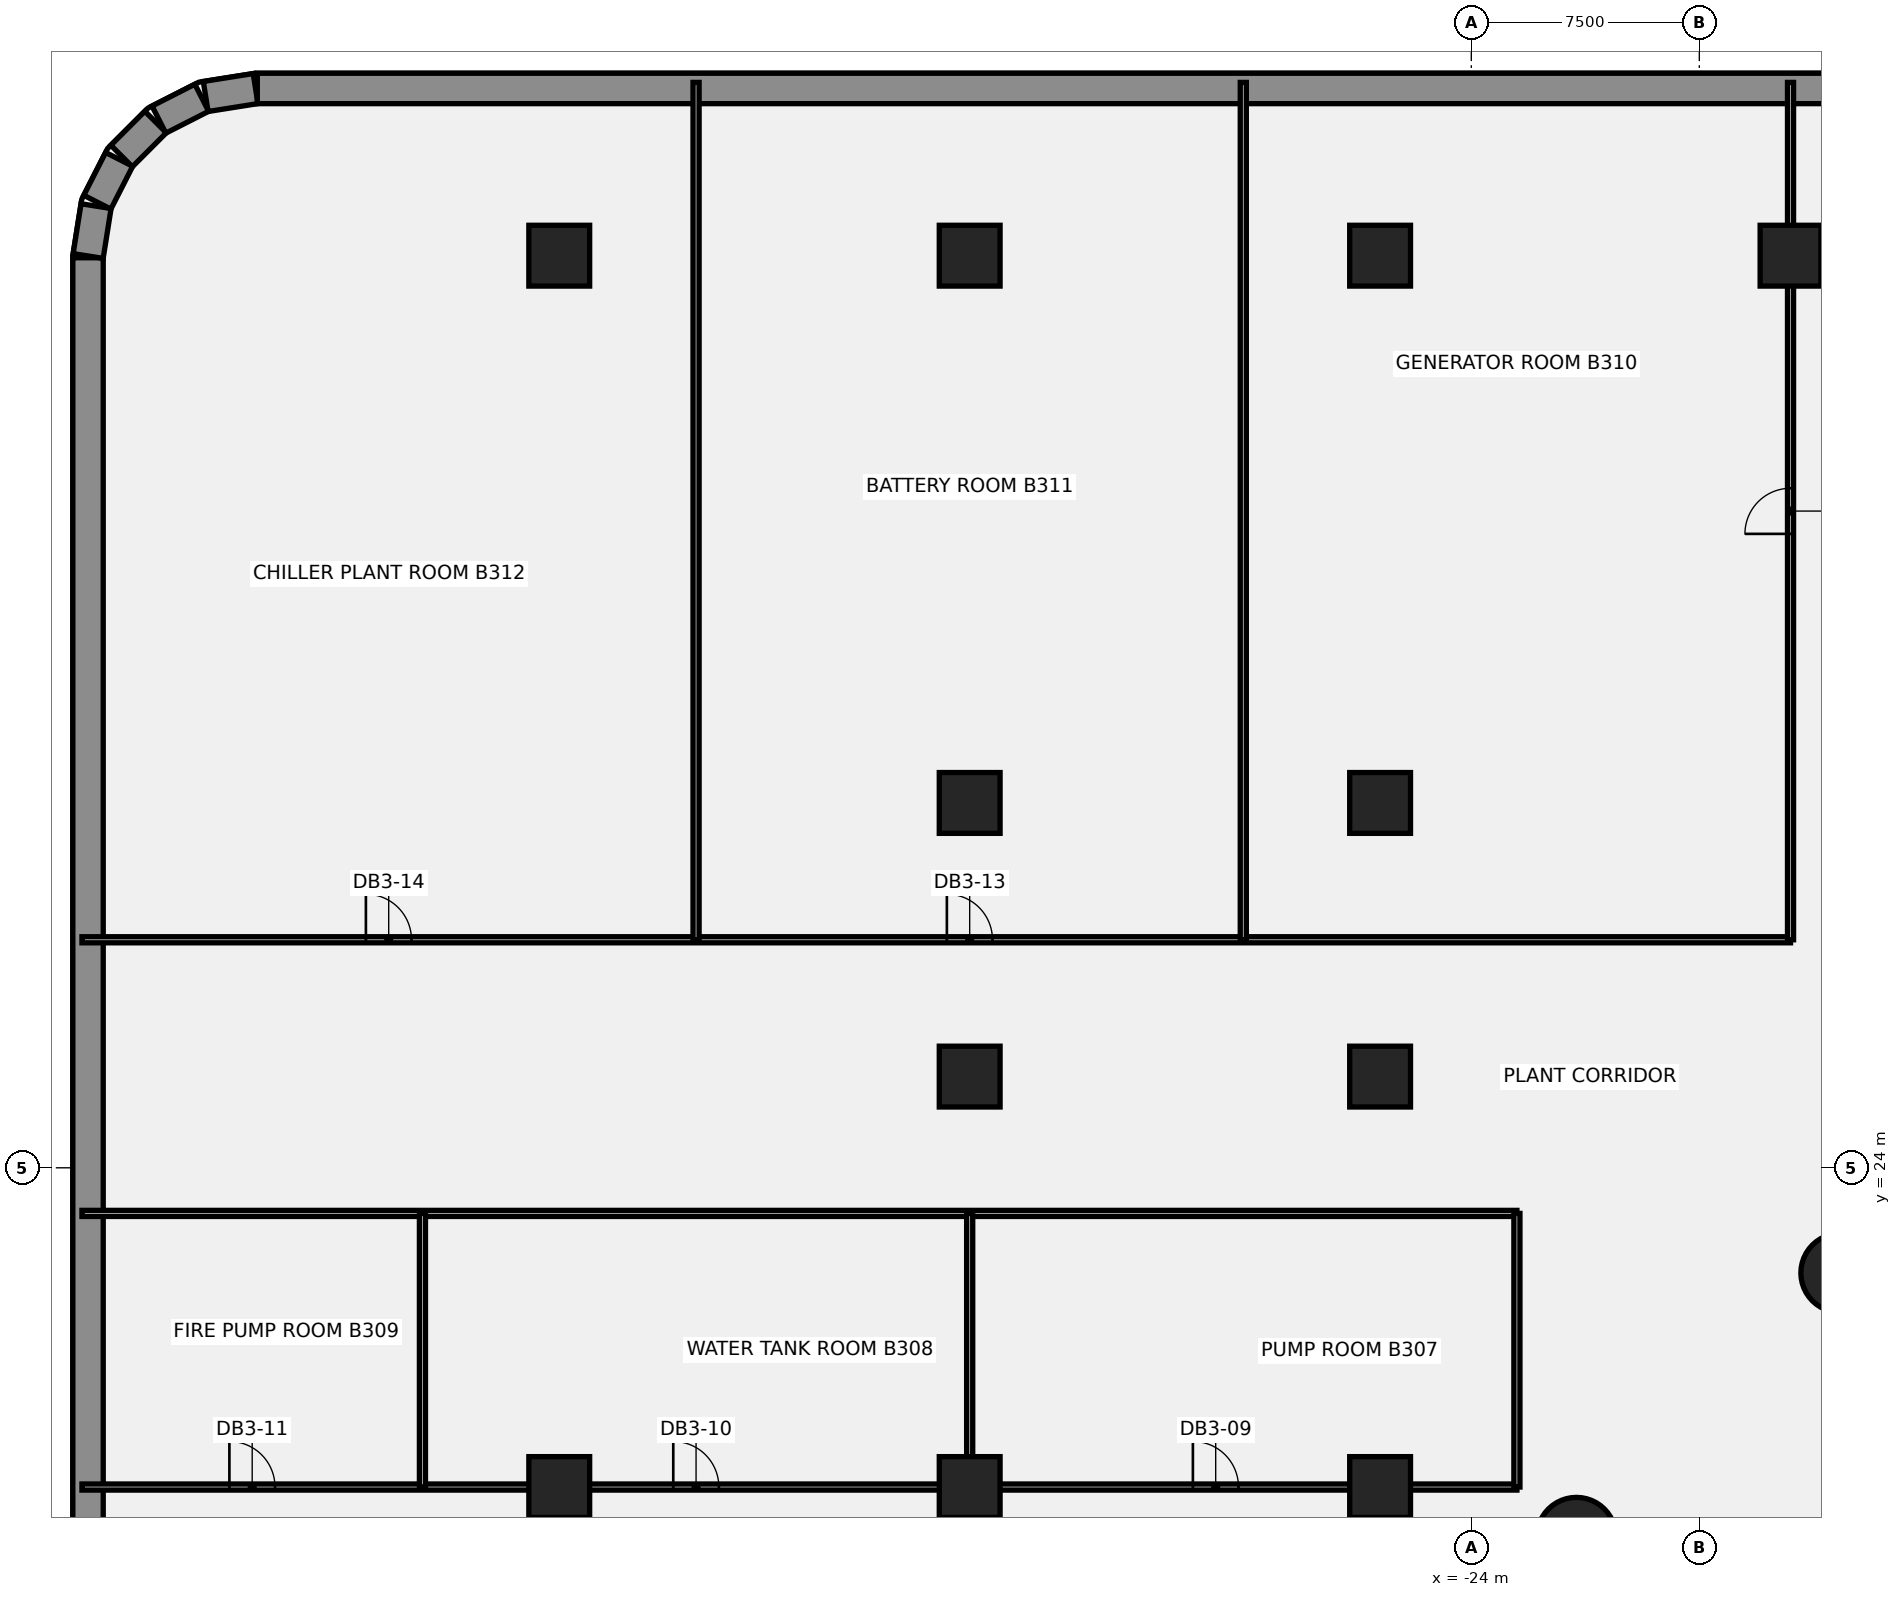
"""IFC4 building model, lengths in metres.
Left out: names, types, materials, properties, quantities, classifications, styles, units other than length and angle.
Written with IfcOpenShell. Run it as: python <this file> out.ifc"""

import sys

from ifc_helpers import new_model, si_unit, direction, frame, frame_2d, origin, origin_2d, place, context, subcontext, project, spatial, rectangle, circle, extrude, element, fill, save


model = new_model("IFC4")
c1 = context("Model", 3, precision=1e-05, world=origin(), true_north=direction((0.0, 1.0)))
c2 = subcontext(c1, "Body", "Model", "MODEL_VIEW")
j1 = project(units=[si_unit("LENGTHUNIT", "METRE"), si_unit("PLANEANGLEUNIT", "RADIAN")], contexts=[c1])
p1 = place(None, origin())
s1 = spatial("IfcSite", under=j1, at=p1, CompositionType="ELEMENT")
p2 = place(p1, origin())
s2 = spatial("IfcBuilding", under=s1, at=p2, CompositionType="ELEMENT")
p3 = place(p2, frame((0.0, 0.0, -21.0)))
s3 = spatial("IfcBuildingStorey", under=s2, at=p3, CompositionType="ELEMENT", Elevation=-21.0)
p4 = place(p3, frame((-69.5, -53.931, -0.3), z_axis=(0.0, 0.0, 1.0), x_axis=(0.0, 1.0, 0.0)))
e1 = element("IfcWall", 1, at=p4, inside=s3, PredefinedType="SOLIDWALL", context=c2, shape_type="SweptSolid", body=[
    extrude(rectangle(XDim=107.863, YDim=1.0, at=frame_2d((53.931, 0.0))), origin(), (0.0, 0.0, 1.0), 6.85),
])
p5 = place(p3, frame((-69.495, 53.99, -0.3), z_axis=(0.0, 0.0, 1.0), x_axis=(0.156430639922, 0.987688946427, 0.0)))
e2 = element("IfcWall", 2, at=p5, inside=s3, PredefinedType="SOLIDWALL", context=c2, shape_type="SweptSolid", body=[
    extrude(rectangle(XDim=1.661, YDim=1.0, at=frame_2d((0.83, 0.0))), origin(), (0.0, 0.0, 1.0), 6.85),
])
for number, where, z_axis, x_axis in (
    (3, (-69.194, 55.759, -0.3), (0.0, 0.0, 1.0), (0.454, 0.891, 0.0)),
    (4, (-68.396, 57.278, -0.3), (0.0, 0.0, 1.0), (0.707, 0.707, 0.0)),
    (5, (-67.168, 58.476, -0.3), (0.0, 0.0, 1.0), (0.891, 0.454, 0.0)),
):
    element("IfcWall", number, at=place(p3, frame(where, z_axis=z_axis, x_axis=x_axis)), inside=s3, PredefinedType="SOLIDWALL", context=c2, shape_type="SweptSolid", body=[
        extrude(rectangle(XDim=1.581, YDim=1.0, at=frame_2d((0.791, 0.0))), origin(), (0.0, 0.0, 1.0), 6.85),
    ])
p6 = place(p3, frame((-65.63, 59.236, -0.3), z_axis=(0.0, 0.0, 1.0), x_axis=(0.987688946427, 0.156430639922, 0.0)))
e6 = element("IfcWall", 6, at=p6, inside=s3, PredefinedType="SOLIDWALL", context=c2, shape_type="SweptSolid", body=[
    extrude(rectangle(XDim=1.661, YDim=1.0, at=frame_2d((0.83, 0.0))), origin(), (0.0, 0.0, 1.0), 6.85),
])
p7 = place(p3, frame((-63.931, 59.5, -0.3), z_axis=(0.0, 0.0, 1.0), x_axis=(1.0, 0.0, 0.0)))
e7 = element("IfcWall", 7, at=p7, inside=s3, PredefinedType="SOLIDWALL", context=c2, shape_type="SweptSolid", body=[
    extrude(rectangle(XDim=127.863, YDim=1.0, at=frame_2d((63.931, 0.0))), origin(), (0.0, 0.0, 1.0), 6.85),
])
for number, where, z_axis, x_axis in (
    (8, (-11.86, 20.543, -0.3), (0.0, 0.0, 1.0), (1.0, 0.0, 0.0)),
    (9, (-20.543, 11.86, -0.3), (0.0, 0.0, 1.0), (1.0, 0.0, 0.0)),
):
    element("IfcColumn", number, at=place(p3, frame(where, z_axis=z_axis, x_axis=x_axis)), inside=s3, PredefinedType="COLUMN", context=c2, shape_type="SweptSolid", body=[
        extrude(circle(Radius=1.3, at=origin_2d()), origin(), (0.0, 0.0, 1.0), 6.85),
    ])
for number, where, z_axis, x_axis in (
    (10, (-54.0, 13.5, -0.3), (0.0, 0.0, 1.0), (1.0, 0.0, 0.0)),
    (11, (-54.0, 54.0, -0.3), (0.0, 0.0, 1.0), (1.0, 0.0, 0.0)),
    (12, (-40.5, 13.5, -0.3), (0.0, 0.0, 1.0), (1.0, 0.0, 0.0)),
    (13, (-40.5, 27.0, -0.3), (0.0, 0.0, 1.0), (1.0, 0.0, 0.0)),
    (14, (-40.5, 36.0, -0.3), (0.0, 0.0, 1.0), (1.0, 0.0, 0.0)),
    (15, (-40.5, 54.0, -0.3), (0.0, 0.0, 1.0), (1.0, 0.0, 0.0)),
    (16, (-27.0, 13.5, -0.3), (0.0, 0.0, 1.0), (1.0, 0.0, 0.0)),
    (17, (-27.0, 27.0, -0.3), (0.0, 0.0, 1.0), (1.0, 0.0, 0.0)),
    (18, (-27.0, 36.0, -0.3), (0.0, 0.0, 1.0), (1.0, 0.0, 0.0)),
    (19, (-27.0, 54.0, -0.3), (0.0, 0.0, 1.0), (1.0, 0.0, 0.0)),
    (20, (-13.5, 54.0, -0.3), (0.0, 0.0, 1.0), (1.0, 0.0, 0.0)),
):
    element("IfcColumn", number, at=place(p3, frame(where, z_axis=z_axis, x_axis=x_axis)), inside=s3, PredefinedType="COLUMN", context=c2, shape_type="SweptSolid", body=[
        extrude(rectangle(XDim=2.0, YDim=2.0, at=origin_2d()), origin(), (0.0, 0.0, 1.0), 6.85),
    ])
p8 = place(p3, frame((-69.699, 13.5, 0.0), z_axis=(0.0, 0.0, 1.0), x_axis=(1.0, 0.0, 0.0)))
e21 = element("IfcWall", 21, at=p8, inside=s3, PredefinedType="PARTITIONING", context=c2, shape_type="SweptSolid", body=[
    extrude(rectangle(XDim=47.199, YDim=0.2, at=frame_2d((23.6, 0.0))), origin(), (0.0, 0.0, 1.0), 6.55),
])
p9 = place(p8, frame((36.541, 0.0, 0.0)))
e22 = element("IfcOpeningElement", 22, at=p9, cuts=e21, PredefinedType="OPENING", context=c2, shape_type="SweptSolid", body=[
    extrude(rectangle(XDim=1.5, YDim=2.1, at=frame_2d((0.75, 1.05))), frame((0.0, 0.11, 0.0), z_axis=(0.0, -1.0, 0.0), x_axis=(1.0, 0.0, 0.0)), (0.0, 0.0, 1.0), 0.22),
])
p10 = place(p8, frame((19.449, 0.0, 0.0)))
e23 = element("IfcOpeningElement", 23, at=p10, cuts=e21, PredefinedType="OPENING", context=c2, shape_type="SweptSolid", body=[
    extrude(rectangle(XDim=1.5, YDim=2.1, at=frame_2d((0.75, 1.05))), frame((0.0, 0.11, 0.0), z_axis=(0.0, -1.0, 0.0), x_axis=(1.0, 0.0, 0.0)), (0.0, 0.0, 1.0), 0.22),
])
p11 = place(p8, frame((4.849, 0.0, 0.0)))
e24 = element("IfcOpeningElement", 24, at=p11, cuts=e21, PredefinedType="OPENING", context=c2, shape_type="SweptSolid", body=[
    extrude(rectangle(XDim=1.5, YDim=2.1, at=frame_2d((0.75, 1.05))), frame((0.0, 0.11, 0.0), z_axis=(0.0, -1.0, 0.0), x_axis=(1.0, 0.0, 0.0)), (0.0, 0.0, 1.0), 0.22),
])
p12 = place(p3, frame((-69.699, 22.5, 0.0), z_axis=(0.0, 0.0, 1.0), x_axis=(1.0, 0.0, 0.0)))
e25 = element("IfcWall", 25, at=p12, inside=s3, PredefinedType="PARTITIONING", context=c2, shape_type="SweptSolid", body=[
    extrude(rectangle(XDim=47.199, YDim=0.2, at=frame_2d((23.6, 0.0))), origin(), (0.0, 0.0, 1.0), 6.55),
])
p13 = place(p3, frame((-69.699, 31.5, 0.0), z_axis=(0.0, 0.0, 1.0), x_axis=(1.0, 0.0, 0.0)))
e26 = element("IfcWall", 26, at=p13, inside=s3, PredefinedType="PARTITIONING", context=c2, shape_type="SweptSolid", body=[
    extrude(rectangle(XDim=56.199, YDim=0.2, at=frame_2d((28.1, 0.0))), origin(), (0.0, 0.0, 1.0), 6.55),
])
p14 = place(p13, frame((28.449, 0.0, 0.0)))
e27 = element("IfcOpeningElement", 27, at=p14, cuts=e26, PredefinedType="OPENING", context=c2, shape_type="SweptSolid", body=[
    extrude(rectangle(XDim=1.5, YDim=2.1, at=frame_2d((0.75, 1.05))), frame((0.0, 0.11, 0.0), z_axis=(0.0, -1.0, 0.0), x_axis=(1.0, 0.0, 0.0)), (0.0, 0.0, 1.0), 0.22),
])
p15 = place(p13, frame((9.339, 0.0, 0.0)))
e28 = element("IfcOpeningElement", 28, at=p15, cuts=e26, PredefinedType="OPENING", context=c2, shape_type="SweptSolid", body=[
    extrude(rectangle(XDim=1.5, YDim=2.1, at=frame_2d((0.75, 1.05))), frame((0.0, 0.11, 0.0), z_axis=(0.0, -1.0, 0.0), x_axis=(1.0, 0.0, 0.0)), (0.0, 0.0, 1.0), 0.22),
])
p16 = place(p3, frame((-58.5, 13.5, 0.0), z_axis=(0.0, 0.0, 1.0), x_axis=(0.0, 1.0, 0.0)))
e29 = element("IfcWall", 29, at=p16, inside=s3, PredefinedType="PARTITIONING", context=c2, shape_type="SweptSolid", body=[
    extrude(rectangle(XDim=9.0, YDim=0.2, at=frame_2d((4.5, 0.0))), origin(), (0.0, 0.0, 1.0), 6.55),
])
p17 = place(p3, frame((-49.5, 31.5, 0.0), z_axis=(0.0, 0.0, 1.0), x_axis=(0.0, 1.0, 0.0)))
e30 = element("IfcWall", 30, at=p17, inside=s3, PredefinedType="PARTITIONING", context=c2, shape_type="SweptSolid", body=[
    extrude(rectangle(XDim=28.199, YDim=0.2, at=frame_2d((14.1, 0.0))), origin(), (0.0, 0.0, 1.0), 6.55),
])
for number, where, z_axis, x_axis in (
    (31, (-22.5, 13.5, 0.0), (0.0, 0.0, 1.0), (0.0, 1.0, 0.0)),
    (32, (-40.5, 13.5, 0.0), (0.0, 0.0, 1.0), (0.0, 1.0, 0.0)),
):
    element("IfcWall", number, at=place(p3, frame(where, z_axis=z_axis, x_axis=x_axis)), inside=s3, PredefinedType="PARTITIONING", context=c2, shape_type="SweptSolid", body=[
        extrude(rectangle(XDim=9.0, YDim=0.2, at=frame_2d((4.5, 0.0))), origin(), (0.0, 0.0, 1.0), 6.55),
    ])
p18 = place(p3, frame((-13.5, 31.5, 0.0), z_axis=(0.0, 0.0, 1.0), x_axis=(0.0, 1.0, 0.0)))
e33 = element("IfcWall", 33, at=p18, inside=s3, PredefinedType="PARTITIONING", context=c2, shape_type="SweptSolid", body=[
    extrude(rectangle(XDim=28.199, YDim=0.2, at=frame_2d((14.1, 0.0))), origin(), (0.0, 0.0, 1.0), 6.55),
])
p19 = place(p18, frame((13.35, 0.0, 0.0)))
e34 = element("IfcOpeningElement", 34, at=p19, cuts=e33, PredefinedType="OPENING", context=c2, shape_type="SweptSolid", body=[
    extrude(rectangle(XDim=1.5, YDim=2.1, at=frame_2d((0.75, 1.05))), frame((0.0, 0.11, 0.0), z_axis=(0.0, -1.0, 0.0), x_axis=(1.0, 0.0, 0.0)), (0.0, 0.0, 1.0), 0.22),
])
p20 = place(p3, frame((-31.5, 31.5, 0.0), z_axis=(0.0, 0.0, 1.0), x_axis=(0.0, 1.0, 0.0)))
e35 = element("IfcWall", 35, at=p20, inside=s3, PredefinedType="PARTITIONING", context=c2, shape_type="SweptSolid", body=[
    extrude(rectangle(XDim=28.199, YDim=0.2, at=frame_2d((14.1, 0.0))), origin(), (0.0, 0.0, 1.0), 6.55),
])
p21 = place(p9, origin())
e36 = element("IfcDoor", 36, at=p21, inside=s3, OperationType="SINGLE_SWING_LEFT", PredefinedType="DOOR", context=c2, shape_type="SweptSolid", body=[
    extrude(rectangle(XDim=1.5, YDim=2.1, at=frame_2d((0.75, 1.05))), frame((0.0, 0.025, 0.0), z_axis=(0.0, -1.0, 0.0), x_axis=(1.0, 0.0, 0.0)), (0.0, 0.0, 1.0), 0.05),
])
fill(e22, e36)
p22 = place(p10, origin())
e37 = element("IfcDoor", 37, at=p22, inside=s3, OperationType="SINGLE_SWING_RIGHT", PredefinedType="DOOR", context=c2, shape_type="SweptSolid", body=[
    extrude(rectangle(XDim=1.5, YDim=2.1, at=frame_2d((0.75, 1.05))), frame((0.0, 0.025, 0.0), z_axis=(0.0, -1.0, 0.0), x_axis=(1.0, 0.0, 0.0)), (0.0, 0.0, 1.0), 0.05),
])
fill(e23, e37)
p23 = place(p11, origin())
e38 = element("IfcDoor", 38, at=p23, inside=s3, OperationType="SINGLE_SWING_LEFT", PredefinedType="DOOR", context=c2, shape_type="SweptSolid", body=[
    extrude(rectangle(XDim=1.5, YDim=2.1, at=frame_2d((0.75, 1.05))), frame((0.0, 0.025, 0.0), z_axis=(0.0, -1.0, 0.0), x_axis=(1.0, 0.0, 0.0)), (0.0, 0.0, 1.0), 0.05),
])
fill(e24, e38)
p24 = place(p19, origin())
e39 = element("IfcDoor", 39, at=p24, inside=s3, OperationType="SINGLE_SWING_RIGHT", PredefinedType="DOOR", context=c2, shape_type="SweptSolid", body=[
    extrude(rectangle(XDim=1.5, YDim=2.1, at=frame_2d((0.75, 1.05))), frame((0.0, 0.025, 0.0), z_axis=(0.0, -1.0, 0.0), x_axis=(1.0, 0.0, 0.0)), (0.0, 0.0, 1.0), 0.05),
])
fill(e34, e39)
p25 = place(p14, origin())
e40 = element("IfcDoor", 40, at=p25, inside=s3, OperationType="SINGLE_SWING_LEFT", PredefinedType="DOOR", context=c2, shape_type="SweptSolid", body=[
    extrude(rectangle(XDim=1.5, YDim=2.1, at=frame_2d((0.75, 1.05))), frame((0.0, 0.025, 0.0), z_axis=(0.0, -1.0, 0.0), x_axis=(1.0, 0.0, 0.0)), (0.0, 0.0, 1.0), 0.05),
])
fill(e27, e40)
p26 = place(p15, origin())
e41 = element("IfcDoor", 41, at=p26, inside=s3, OperationType="SINGLE_SWING_RIGHT", PredefinedType="DOOR", context=c2, shape_type="SweptSolid", body=[
    extrude(rectangle(XDim=1.5, YDim=2.1, at=frame_2d((0.75, 1.05))), frame((0.0, 0.025, 0.0), z_axis=(0.0, -1.0, 0.0), x_axis=(1.0, 0.0, 0.0)), (0.0, 0.0, 1.0), 0.05),
])
fill(e28, e41)
save(model, sys.argv[1])
